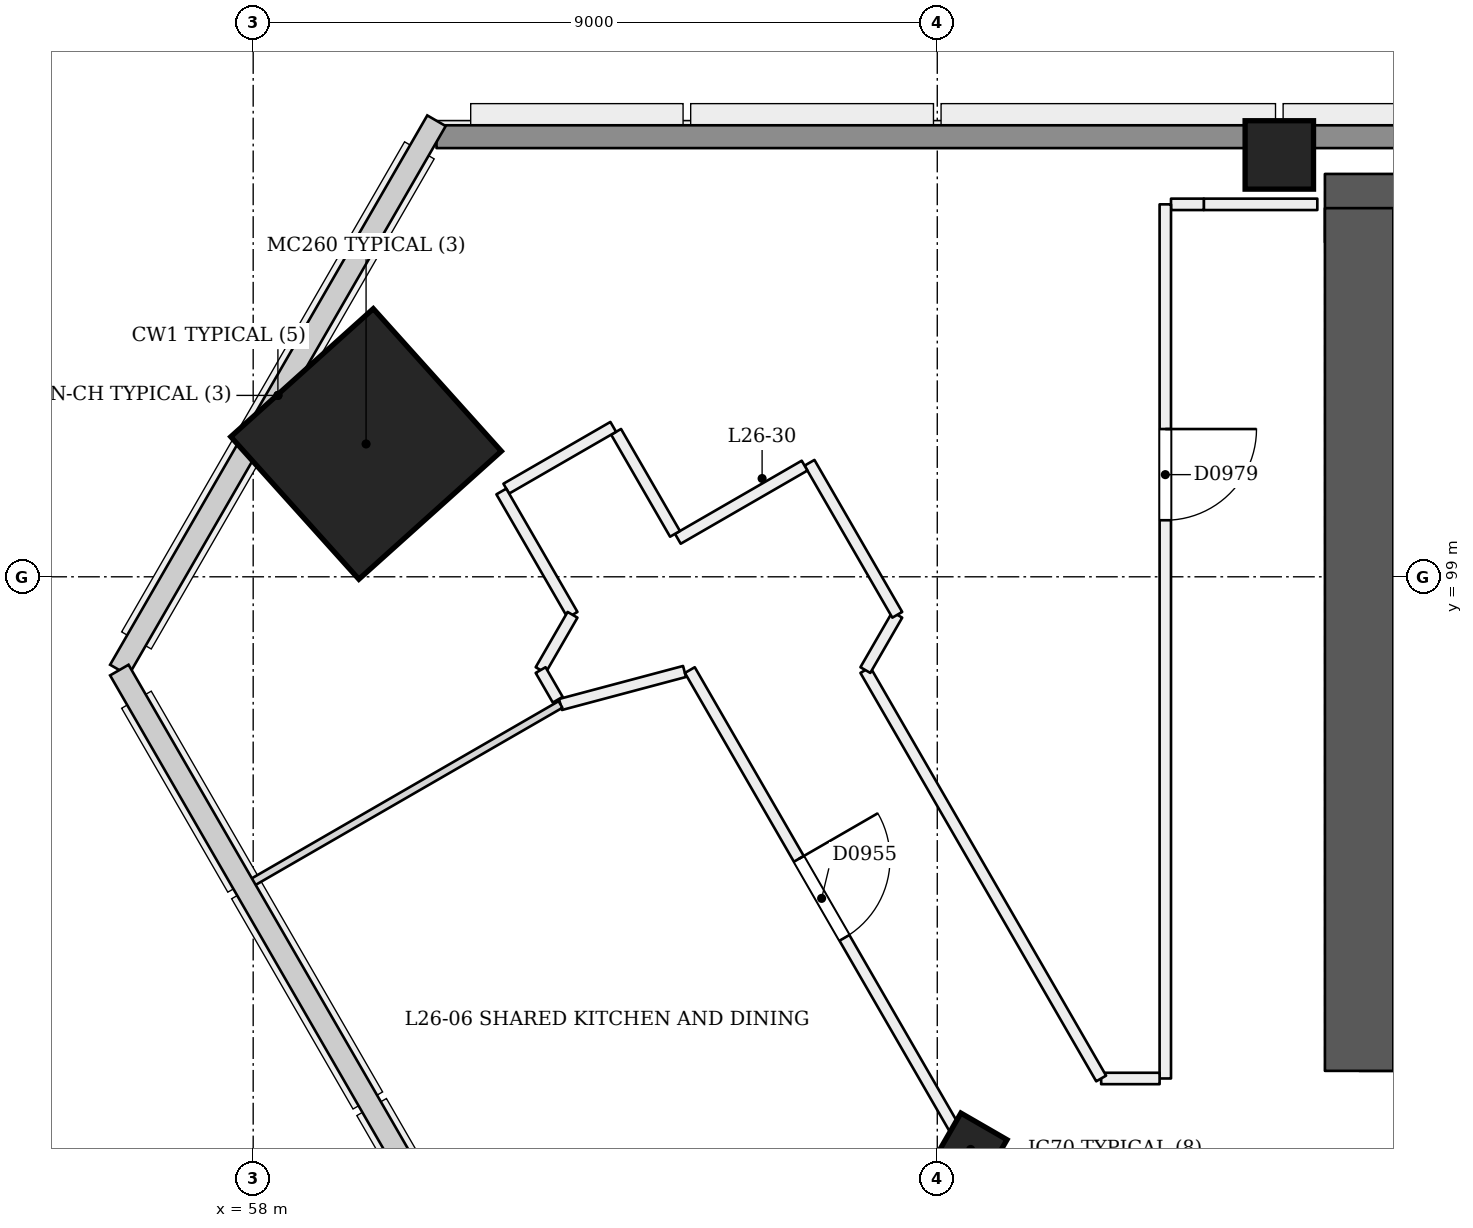
"""IFC4 building model, lengths in metres.
Left out: names, types, materials, properties, quantities, classifications, styles, units other than length and angle.
Written with IfcOpenShell. Run it as: python <this file> out.ifc"""

import sys

from ifc_helpers import new_model, si_unit, direction, frame, frame_2d, origin, origin_2d, place, context, subcontext, project, spatial, rectangle, extrude, element, fill, save


model = new_model("IFC4")
c1 = context("Model", 3, precision=1e-05, world=origin(), true_north=direction((0.0, 1.0)))
c2 = subcontext(c1, "Body", "Model", "MODEL_VIEW")
j1 = project(units=[si_unit("LENGTHUNIT", "METRE"), si_unit("PLANEANGLEUNIT", "RADIAN")], contexts=[c1])
p1 = place(None, origin())
s1 = spatial("IfcSite", under=j1, at=p1, CompositionType="ELEMENT")
p2 = place(p1, origin())
s2 = spatial("IfcBuilding", under=s1, at=p2, CompositionType="ELEMENT")
p3 = place(p2, frame((0.0, 0.0, 104.4)))
s3 = spatial("IfcBuildingStorey", under=s2, at=p3, CompositionType="ELEMENT", Elevation=104.4)
p4 = place(p3, frame((72.55, 92.95, 0.0), z_axis=(0.0, 0.0, 1.0), x_axis=(1.0, 0.0, 0.0)))
e1 = element("IfcWall", 1, at=p4, inside=s3, PredefinedType="SHEAR", context=c2, shape_type="SweptSolid", body=[
    extrude(rectangle(XDim=25.35, YDim=0.9, at=frame_2d((12.675, 0.0))), origin(), (0.0, 0.0, 1.0), 3.6),
])
p5 = place(p4, frame((1.25, 0.0, 0.0)))
e2 = element("IfcOpeningElement", 2, at=p5, cuts=e1, PredefinedType="OPENING", context=c2, shape_type="SweptSolid", body=[
    extrude(rectangle(XDim=1.2, YDim=2.1, at=frame_2d((0.6, 1.05))), frame((0.0, 0.46, 0.0), z_axis=(0.0, -1.0, 0.0), x_axis=(1.0, 0.0, 0.0)), (0.0, 0.0, 1.0), 0.921),
])
p6 = place(p4, frame((3.45, 0.0, 0.0)))
e3 = element("IfcOpeningElement", 3, at=p6, cuts=e1, PredefinedType="OPENING", context=c2, shape_type="SweptSolid", body=[
    extrude(rectangle(XDim=1.2, YDim=2.1, at=frame_2d((0.6, 1.05))), frame((0.0, 0.46, 0.0), z_axis=(0.0, -1.0, 0.0), x_axis=(1.0, 0.0, 0.0)), (0.0, 0.0, 1.0), 0.921),
])
p7 = place(p4, frame((13.45, 0.0, 0.0)))
e4 = element("IfcOpeningElement", 4, at=p7, cuts=e1, PredefinedType="OPENING", context=c2, shape_type="SweptSolid", body=[
    extrude(rectangle(XDim=1.2, YDim=2.1, at=frame_2d((0.6, 1.05))), frame((0.0, 0.46, 0.0), z_axis=(0.0, -1.0, 0.0), x_axis=(1.0, 0.0, 0.0)), (0.0, 0.0, 1.0), 0.921),
])
p8 = place(p4, frame((16.163, 0.0, 0.0)))
e5 = element("IfcOpeningElement", 5, at=p8, cuts=e1, PredefinedType="OPENING", context=c2, shape_type="SweptSolid", body=[
    extrude(rectangle(XDim=1.0, YDim=2.1, at=frame_2d((0.5, 1.05))), frame((0.0, 0.46, 0.0), z_axis=(0.0, -1.0, 0.0), x_axis=(1.0, 0.0, 0.0)), (0.0, 0.0, 1.0), 0.921),
])
p9 = place(p4, frame((20.05, 0.0, 0.0)))
e6 = element("IfcOpeningElement", 6, at=p9, cuts=e1, PredefinedType="OPENING", context=c2, shape_type="SweptSolid", body=[
    extrude(rectangle(XDim=1.0, YDim=2.1, at=frame_2d((0.5, 1.05))), frame((0.0, 0.46, 0.0), z_axis=(0.0, -1.0, 0.0), x_axis=(1.0, 0.0, 0.0)), (0.0, 0.0, 1.0), 0.921),
])
p10 = place(p4, frame((23.188, 0.0, 0.0)))
e7 = element("IfcOpeningElement", 7, at=p10, cuts=e1, PredefinedType="OPENING", context=c2, shape_type="SweptSolid", body=[
    extrude(rectangle(XDim=1.0, YDim=2.1, at=frame_2d((0.5, 1.05))), frame((0.0, 0.46, 0.0), z_axis=(0.0, -1.0, 0.0), x_axis=(1.0, 0.0, 0.0)), (0.0, 0.0, 1.0), 0.921),
])
p11 = place(p3, frame((97.45, 103.85, 0.0), z_axis=(0.0, 0.0, 1.0), x_axis=(-1.0, 0.0, 0.0)))
e8 = element("IfcWall", 8, at=p11, inside=s3, PredefinedType="SHEAR", context=c2, shape_type="SweptSolid", body=[
    extrude(rectangle(XDim=25.35, YDim=0.9, at=frame_2d((12.675, 0.0))), origin(), (0.0, 0.0, 1.0), 3.6),
])
p12 = place(p3, frame((72.55, 103.85, 0.0), z_axis=(0.0, 0.0, 1.0), x_axis=(0.0, -1.0, 0.0)))
e9 = element("IfcWall", 9, at=p12, inside=s3, PredefinedType="SHEAR", context=c2, shape_type="SweptSolid", body=[
    extrude(rectangle(XDim=11.35, YDim=0.9, at=frame_2d((5.675, 0.0))), origin(), (0.0, 0.0, 1.0), 3.6),
])
p13 = place(p3, frame((67.412, 91.419, -0.021), z_axis=(0.02222134892, 0.038480872521, 0.999012229206), x_axis=(-0.865639418776, -0.499186807044, 0.038482831667)))
e10 = element("IfcColumn", 10, at=p13, inside=s3, PredefinedType="COLUMN", context=c2, shape_type="SweptSolid", body=[
    extrude(rectangle(XDim=0.7, YDim=0.7, at=origin_2d()), origin(), (0.0, 0.0, 1.0), 3.604),
])
p14 = place(p3, frame((59.451, 100.736, 0.0), z_axis=(0.028401796786, 0.009286506348, 0.999553449666), x_axis=(-0.86620189855, 0.499294816778, 0.019973905167)))
e11 = element("IfcColumn", 11, at=p14, inside=s3, PredefinedType="COLUMN", context=c2, shape_type="SweptSolid", body=[
    extrude(rectangle(XDim=2.52, YDim=2.52, at=origin_2d()), origin(), (0.0, 0.0, 1.0), 3.602),
])
p15 = place(p3, frame((71.5, 104.55, 0.0), z_axis=(0.0, 0.0, 1.0), x_axis=(1.0, 0.0, 0.0)))
e12 = element("IfcColumn", 12, at=p15, inside=s3, PredefinedType="COLUMN", context=c2, shape_type="SweptSolid", body=[
    extrude(rectangle(XDim=0.9, YDim=0.9, at=origin_2d()), origin(), (0.0, 0.0, 1.0), 3.6),
])
p16 = place(p3, frame((62.043, 97.32, 0.0), z_axis=(0.0, 0.0, 1.0), x_axis=(0.966383581826, 0.257104595015, 0.0)))
e13 = element("IfcWall", 13, at=p16, inside=s3, PredefinedType="PARTITIONING", context=c2, shape_type="SweptSolid", body=[
    extrude(rectangle(XDim=1.688, YDim=0.15, at=frame_2d((0.844, 0.0))), origin(), (0.0, 0.0, 1.0), 3.1),
])
p17 = place(p3, frame((63.745, 97.773, 0.0), z_axis=(0.0, 0.0, 1.0), x_axis=(0.500001045382, -0.866024800232, 0.0)))
e14 = element("IfcWall", 14, at=p17, inside=s3, PredefinedType="PARTITIONING", context=c2, shape_type="SweptSolid", body=[
    extrude(rectangle(XDim=41.671, YDim=0.15, at=frame_2d((20.836, 0.0))), origin(), (0.0, 0.0, 1.0), 2.7),
])
p18 = place(p17, frame((2.868, 0.0, 0.0)))
e15 = element("IfcOpeningElement", 15, at=p18, cuts=e14, PredefinedType="OPENING", context=c2, shape_type="SweptSolid", body=[
    extrude(rectangle(XDim=1.2, YDim=2.1, at=frame_2d((0.6, 1.05))), frame((0.0, 0.085, 0.0), z_axis=(0.0, -1.0, 0.0), x_axis=(1.0, 0.0, 0.0)), (0.0, 0.0, 1.0), 0.171),
])
p19 = place(p17, frame((10.115, 0.0, 0.0)))
e16 = element("IfcOpeningElement", 16, at=p19, cuts=e14, PredefinedType="OPENING", context=c2, shape_type="SweptSolid", body=[
    extrude(rectangle(XDim=1.0, YDim=2.1, at=frame_2d((0.5, 1.05))), frame((0.0, 0.085, 0.0), z_axis=(0.0, -1.0, 0.0), x_axis=(1.0, 0.0, 0.0)), (0.0, 0.0, 1.0), 0.171),
])
p20 = place(p17, frame((12.44, 0.0, 0.0)))
e17 = element("IfcOpeningElement", 17, at=p20, cuts=e14, PredefinedType="OPENING", context=c2, shape_type="SweptSolid", body=[
    extrude(rectangle(XDim=1.0, YDim=2.1, at=frame_2d((0.5, 1.05))), frame((0.0, 0.085, 0.0), z_axis=(0.0, -1.0, 0.0), x_axis=(1.0, 0.0, 0.0)), (0.0, 0.0, 1.0), 0.171),
])
p21 = place(p17, frame((19.231, 0.0, 0.0)))
e18 = element("IfcOpeningElement", 18, at=p21, cuts=e14, PredefinedType="OPENING", context=c2, shape_type="SweptSolid", body=[
    extrude(rectangle(XDim=1.0, YDim=2.1, at=frame_2d((0.5, 1.05))), frame((0.0, 0.085, 0.0), z_axis=(0.0, -1.0, 0.0), x_axis=(1.0, 0.0, 0.0)), (0.0, 0.0, 1.0), 0.171),
])
p22 = place(p17, frame((21.556, 0.0, 0.0)))
e19 = element("IfcOpeningElement", 19, at=p22, cuts=e14, PredefinedType="OPENING", context=c2, shape_type="SweptSolid", body=[
    extrude(rectangle(XDim=1.0, YDim=2.1, at=frame_2d((0.5, 1.05))), frame((0.0, 0.085, 0.0), z_axis=(0.0, -1.0, 0.0), x_axis=(1.0, 0.0, 0.0)), (0.0, 0.0, 1.0), 0.171),
])
p23 = place(p17, frame((27.086, 0.0, 0.0)))
e20 = element("IfcOpeningElement", 20, at=p23, cuts=e14, PredefinedType="OPENING", context=c2, shape_type="SweptSolid", body=[
    extrude(rectangle(XDim=1.0, YDim=2.1, at=frame_2d((0.5, 1.05))), frame((0.0, 0.085, 0.0), z_axis=(0.0, -1.0, 0.0), x_axis=(1.0, 0.0, 0.0)), (0.0, 0.0, 1.0), 0.171),
])
p24 = place(p17, frame((30.44, 0.0, 0.0)))
e21 = element("IfcOpeningElement", 21, at=p24, cuts=e14, PredefinedType="OPENING", context=c2, shape_type="SweptSolid", body=[
    extrude(rectangle(XDim=1.0, YDim=2.1, at=frame_2d((0.5, 1.05))), frame((0.0, 0.085, 0.0), z_axis=(0.0, -1.0, 0.0), x_axis=(1.0, 0.0, 0.0)), (0.0, 0.0, 1.0), 0.171),
])
p25 = place(p17, frame((37.619, 0.0, 0.0)))
e22 = element("IfcOpeningElement", 22, at=p25, cuts=e14, PredefinedType="OPENING", context=c2, shape_type="SweptSolid", body=[
    extrude(rectangle(XDim=1.2, YDim=2.1, at=frame_2d((0.6, 1.05))), frame((0.0, 0.085, 0.0), z_axis=(0.0, -1.0, 0.0), x_axis=(1.0, 0.0, 0.0)), (0.0, 0.0, 1.0), 0.171),
])
p26 = place(p3, frame((72.0, 103.9, 0.0), z_axis=(0.0, 0.0, 1.0), x_axis=(-1.0, 0.0, 0.0)))
e23 = element("IfcWall", 23, at=p26, inside=s3, PredefinedType="PARTITIONING", context=c2, shape_type="SweptSolid", body=[
    extrude(rectangle(XDim=1.493, YDim=0.15, at=frame_2d((0.747, 0.0))), origin(), (0.0, 0.0, 1.0), 3.1),
])
p27 = place(p3, frame((70.507, 103.9, 0.0), z_axis=(0.0, 0.0, 1.0), x_axis=(-1.0, 0.0, 0.0)))
e24 = element("IfcWall", 24, at=p27, inside=s3, PredefinedType="PARTITIONING", context=c2, shape_type="SweptSolid", body=[
    extrude(rectangle(XDim=0.432, YDim=0.15, at=frame_2d((0.216, 0.0))), origin(), (0.0, 0.0, 1.0), 2.6),
])
p28 = place(p3, frame((70.0, 103.9, 0.0), z_axis=(0.0, 0.0, 1.0), x_axis=(0.0, -1.0, 0.0)))
e25 = element("IfcWall", 25, at=p28, inside=s3, PredefinedType="PARTITIONING", context=c2, shape_type="SweptSolid", body=[
    extrude(rectangle(XDim=11.5, YDim=0.15, at=frame_2d((5.75, 0.0))), origin(), (0.0, 0.0, 1.0), 2.6),
])
p29 = place(p28, frame((2.956, 0.0, 0.0)))
e26 = element("IfcOpeningElement", 26, at=p29, cuts=e25, PredefinedType="OPENING", context=c2, shape_type="SweptSolid", body=[
    extrude(rectangle(XDim=1.2, YDim=2.1, at=frame_2d((0.6, 1.05))), frame((0.0, 0.085, 0.0), z_axis=(0.0, -1.0, 0.0), x_axis=(1.0, 0.0, 0.0)), (0.0, 0.0, 1.0), 0.171),
])
p30 = place(p3, frame((69.925, 92.4, 0.0), z_axis=(0.0, 0.0, 1.0), x_axis=(-1.0, 0.0, 0.0)))
e27 = element("IfcWall", 27, at=p30, inside=s3, PredefinedType="PARTITIONING", context=c2, shape_type="SweptSolid", body=[
    extrude(rectangle(XDim=0.769, YDim=0.15, at=frame_2d((0.385, 0.0))), origin(), (0.0, 0.0, 1.0), 3.1),
])
p31 = place(p3, frame((69.156, 92.4, 0.0), z_axis=(0.0, 0.0, 1.0), x_axis=(-0.499990416364, 0.866030936828, 0.0)))
e28 = element("IfcWall", 28, at=p31, inside=s3, PredefinedType="PARTITIONING", context=c2, shape_type="SweptSolid", body=[
    extrude(rectangle(XDim=6.204, YDim=0.15, at=frame_2d((3.102, 0.0))), origin(), (0.0, 0.0, 1.0), 3.1),
])
p32 = place(p3, frame((66.054, 97.773, 0.0), z_axis=(0.0, 0.0, 1.0), x_axis=(0.500141944548, 0.86594343655, 0.0)))
e29 = element("IfcWall", 29, at=p32, inside=s3, PredefinedType="PARTITIONING", context=c2, shape_type="SweptSolid", body=[
    extrude(rectangle(XDim=0.84, YDim=0.15, at=frame_2d((0.42, 0.0))), origin(), (0.0, 0.0, 1.0), 3.1),
])
p33 = place(p3, frame((66.474, 98.5, 0.0), z_axis=(0.0, 0.0, 1.0), x_axis=(-0.500027479704, 0.866009537788, 0.0)))
e30 = element("IfcWall", 30, at=p33, inside=s3, PredefinedType="PARTITIONING", context=c2, shape_type="SweptSolid", body=[
    extrude(rectangle(XDim=2.309, YDim=0.15, at=frame_2d((1.155, 0.0))), origin(), (0.0, 0.0, 1.0), 3.1),
])
p34 = place(p3, frame((65.254, 100.462, 0.0), z_axis=(0.0, 0.0, 1.0), x_axis=(-0.866033512162, -0.499985955615, 0.0)))
e31 = element("IfcWall", 31, at=p34, inside=s3, PredefinedType="PARTITIONING", context=c2, shape_type="SweptSolid", body=[
    extrude(rectangle(XDim=1.925, YDim=0.15, at=frame_2d((0.962, 0.0))), origin(), (0.0, 0.0, 1.0), 3.1),
])
p35 = place(p3, frame((63.55, 99.565, 0.0), z_axis=(0.0, 0.0, 1.0), x_axis=(-0.499967891604, 0.866043940782, 0.0)))
e32 = element("IfcWall", 32, at=p35, inside=s3, PredefinedType="PARTITIONING", context=c2, shape_type="SweptSolid", body=[
    extrude(rectangle(XDim=1.55, YDim=0.15, at=frame_2d((0.775, 0.0))), origin(), (0.0, 0.0, 1.0), 3.1),
])
p36 = place(p3, frame((62.737, 100.972, 0.0), z_axis=(0.0, 0.0, 1.0), x_axis=(-0.866015446554, -0.500017246033, 0.0)))
e33 = element("IfcWall", 33, at=p36, inside=s3, PredefinedType="PARTITIONING", context=c2, shape_type="SweptSolid", body=[
    extrude(rectangle(XDim=1.625, YDim=0.15, at=frame_2d((0.812, 0.0))), origin(), (0.0, 0.0, 1.0), 3.1),
])
p37 = place(p3, frame((61.265, 100.122, 0.0), z_axis=(0.0, 0.0, 1.0), x_axis=(0.499951854219, -0.86605319898, 0.0)))
e34 = element("IfcWall", 34, at=p37, inside=s3, PredefinedType="PARTITIONING", context=c2, shape_type="SweptSolid", body=[
    extrude(rectangle(XDim=1.873, YDim=0.15, at=frame_2d((0.937, 0.0))), origin(), (0.0, 0.0, 1.0), 3.1),
])
p38 = place(p3, frame((62.201, 98.5, 0.0), z_axis=(0.0, 0.0, 1.0), x_axis=(-0.499923853111, -0.866069362748, 0.0)))
e35 = element("IfcWall", 35, at=p38, inside=s3, PredefinedType="PARTITIONING", context=c2, shape_type="SweptSolid", body=[
    extrude(rectangle(XDim=0.84, YDim=0.15, at=frame_2d((0.42, 0.0))), origin(), (0.0, 0.0, 1.0), 3.1),
])
p39 = place(p3, frame((61.782, 97.773, 0.0), z_axis=(0.0, 0.0, 1.0), x_axis=(0.499753735824, -0.866167537795, 0.0)))
e36 = element("IfcWall", 36, at=p39, inside=s3, PredefinedType="PARTITIONING", context=c2, shape_type="SweptSolid", body=[
    extrude(rectangle(XDim=0.45, YDim=0.15, at=frame_2d((0.225, 0.0))), origin(), (0.0, 0.0, 1.0), 3.1),
])
p40 = place(p3, frame((62.043, 97.32, 0.0), z_axis=(0.0, 0.0, 1.0), x_axis=(-0.866015897305, -0.500016465344, 0.0)))
e37 = element("IfcWall", 37, at=p40, inside=s3, PredefinedType="PARTITIONING", context=c2, shape_type="SweptSolid", body=[
    extrude(rectangle(XDim=4.72, YDim=0.1, at=frame_2d((2.36, 0.0))), origin(), (0.0, 0.0, 1.0), 2.6),
])
p41 = place(p3, frame((60.412, 104.79, 0.0), z_axis=(0.0, 0.0, 1.0), x_axis=(1.0, 0.0, 0.0)))
e38 = element("IfcWall", 38, at=p41, inside=s3, PredefinedType="SOLIDWALL", context=c2, shape_type="SweptSolid", body=[
    extrude(rectangle(XDim=49.177, YDim=0.3, at=frame_2d((24.588, 0.0))), origin(), (0.0, 0.0, 1.0), 2.6),
])
p42 = place(p18, origin())
e39 = element("IfcDoor", 39, at=p42, inside=s3, OperationType="SINGLE_SWING_LEFT", PredefinedType="NOTDEFINED", context=c2, shape_type="SweptSolid", body=[
    extrude(rectangle(XDim=1.2, YDim=2.1, at=frame_2d((0.6, 1.05))), frame((0.0, 0.025, 0.0), z_axis=(0.0, -1.0, 0.0), x_axis=(1.0, 0.0, 0.0)), (0.0, 0.0, 1.0), 0.05),
])
fill(e15, e39)
p43 = place(p29, origin())
e40 = element("IfcDoor", 40, at=p43, inside=s3, OperationType="SINGLE_SWING_LEFT", PredefinedType="NOTDEFINED", context=c2, shape_type="SweptSolid", body=[
    extrude(rectangle(XDim=1.2, YDim=2.1, at=frame_2d((0.6, 1.05))), frame((0.0, 0.025, 0.0), z_axis=(0.0, -1.0, 0.0), x_axis=(1.0, 0.0, 0.0)), (0.0, 0.0, 1.0), 0.05),
])
fill(e26, e40)
save(model, sys.argv[1])
